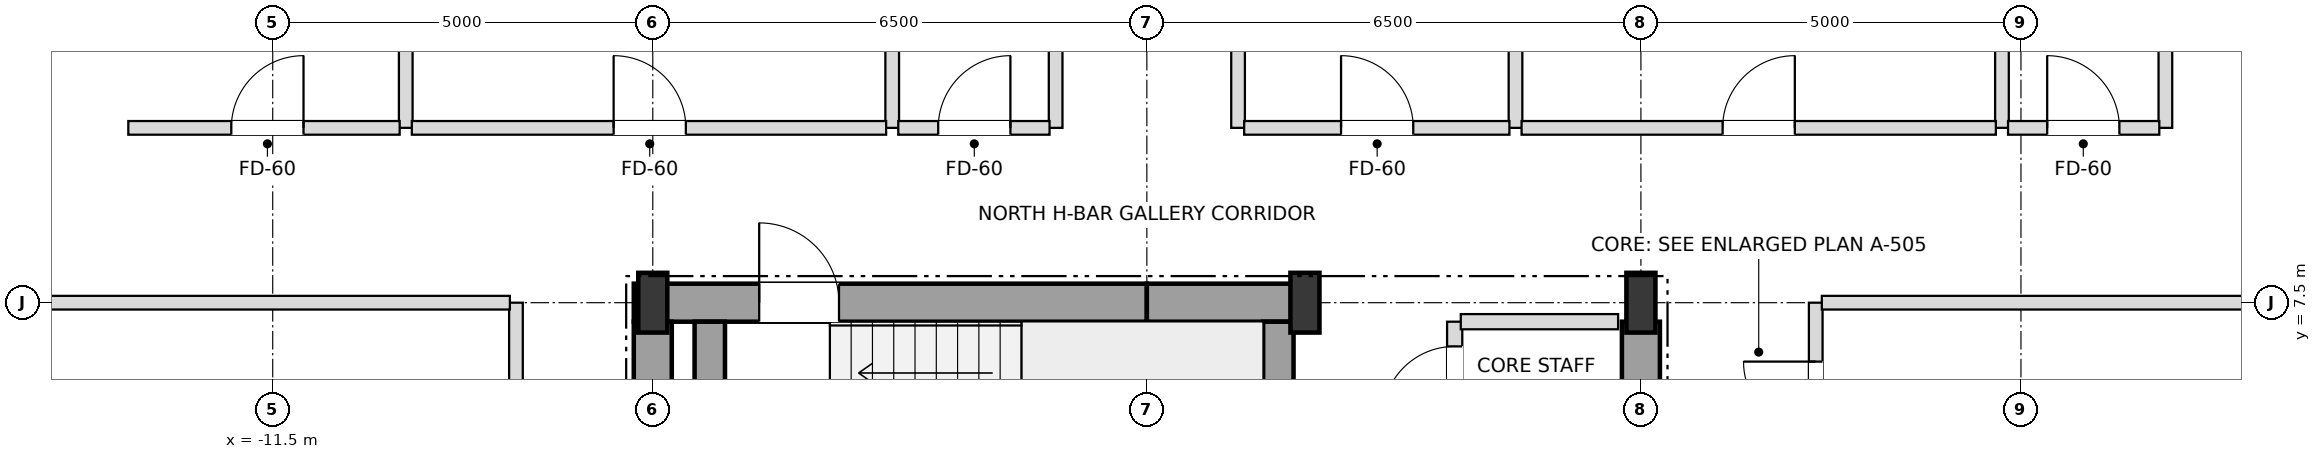
"""IFC4 building model, lengths in metres.
Left out: names, types, materials, properties, quantities, classifications, styles, units other than length and angle.
Written with IfcOpenShell. Run it as: python <this file> out.ifc"""

import sys

from ifc_helpers import new_model, si_unit, direction, frame, frame_2d, origin, origin_2d, place, context, subcontext, project, spatial, rectangle, i_section, extrude, element, fill, save


model = new_model("IFC4")
c1 = context("Model", 3, precision=1e-05, world=origin(), true_north=direction((0.0, 1.0)))
c2 = subcontext(c1, "Body", "Model", "MODEL_VIEW")
j1 = project(units=[si_unit("LENGTHUNIT", "METRE"), si_unit("PLANEANGLEUNIT", "RADIAN")], contexts=[c1])
p1 = place(None, origin())
s1 = spatial("IfcSite", under=j1, at=p1, CompositionType="ELEMENT")
p2 = place(p1, origin())
s2 = spatial("IfcBuilding", under=s1, at=p2, CompositionType="ELEMENT")
p3 = place(p2, frame((0.0, 0.0, 208.8)))
s3 = spatial("IfcBuildingStorey", under=s2, at=p3, CompositionType="ELEMENT", Elevation=208.8)
for number, where, z_axis, x_axis in (
    (1, (-6.5, 7.5, 0.0), (0.0, 0.0, 1.0), (1.0, 0.0, 0.0)),
    (2, (2.08, 7.5, 0.0), (0.0, 0.0, 1.0), (1.0, 0.0, 0.0)),
    (3, (6.5, 7.5, 0.0), (0.0, 0.0, 1.0), (1.0, 0.0, 0.0)),
):
    element("IfcColumn", number, at=place(p3, frame(where, z_axis=z_axis, x_axis=x_axis)), inside=s3, PredefinedType="COLUMN", context=c2, shape_type="SweptSolid", body=[
        extrude(i_section(OverallWidth=0.382, OverallDepth=0.786, WebThickness=0.02, FlangeThickness=0.033, at=origin_2d()), origin(), (0.0, 0.0, 1.0), 3.6),
    ])
p4 = place(p3, frame((-6.75, 7.5, 0.0), z_axis=(0.0, 0.0, 1.0), x_axis=(1.0, 0.0, 0.0)))
e4 = element("IfcWall", 4, at=p4, inside=s3, PredefinedType="SHEAR", context=c2, shape_type="SweptSolid", body=[
    extrude(rectangle(XDim=6.75, YDim=0.5, at=frame_2d((3.375, 0.0))), origin(), (0.0, 0.0, 1.0), 3.3),
])
p5 = place(p4, frame((1.65, 0.0, 0.0)))
e5 = element("IfcOpeningElement", 5, at=p5, cuts=e4, PredefinedType="OPENING", context=c2, shape_type="SweptSolid", body=[
    extrude(rectangle(XDim=1.05, YDim=2.15, at=frame_2d((0.525, 1.075))), frame((0.0, 0.26, 0.0), z_axis=(0.0, -1.0, 0.0), x_axis=(1.0, 0.0, 0.0)), (0.0, 0.0, 1.0), 0.52),
])
p6 = place(p3, frame((0.0, 7.5, 0.0), z_axis=(0.0, 0.0, 1.0), x_axis=(1.0, 0.0, 0.0)))
e6 = element("IfcWall", 6, at=p6, inside=s3, PredefinedType="SHEAR", context=c2, shape_type="SweptSolid", body=[
    extrude(rectangle(XDim=2.08, YDim=0.5, at=frame_2d((1.04, 0.0))), origin(), (0.0, 0.0, 1.0), 3.3),
])
for number, where, z_axis, x_axis in (
    (7, (-6.5, 3.95, 0.0), (0.0, 0.0, 1.0), (0.0, 1.0, 0.0)),
    (8, (6.5, 3.95, 0.0), (0.0, 0.0, 1.0), (0.0, 1.0, 0.0)),
):
    element("IfcWall", number, at=place(p3, frame(where, z_axis=z_axis, x_axis=x_axis)), inside=s3, PredefinedType="SHEAR", context=c2, shape_type="SweptSolid", body=[
        extrude(rectangle(XDim=3.3, YDim=0.5, at=frame_2d((1.65, 0.0))), origin(), (0.0, 0.0, 1.0), 3.3),
    ])
for number, where, z_axis, x_axis in (
    (9, (1.73, 3.95, 0.0), (0.0, 0.0, 1.0), (0.0, 1.0, 0.0)),
    (10, (-5.75, 3.95, 0.0), (0.0, 0.0, 1.0), (0.0, 1.0, 0.0)),
):
    element("IfcWall", number, at=place(p3, frame(where, z_axis=z_axis, x_axis=x_axis)), inside=s3, PredefinedType="SHEAR", context=c2, shape_type="SweptSolid", body=[
        extrude(rectangle(XDim=3.3, YDim=0.4, at=frame_2d((1.65, 0.0))), origin(), (0.0, 0.0, 1.0), 3.3),
    ])
p7 = place(p3, frame((-9.75, 9.8, 0.0), z_axis=(0.0, 0.0, 1.0), x_axis=(0.0, 1.0, 0.0)))
e11 = element("IfcWall", 11, at=p7, inside=s3, PredefinedType="PARTITIONING", context=c2, shape_type="SweptSolid", body=[
    extrude(rectangle(XDim=11.6, YDim=0.18, at=frame_2d((5.8, 0.0))), origin(), (0.0, 0.0, 1.0), 2.746),
])
p8 = place(p3, frame((-8.3, -7.5, 0.0), z_axis=(0.0, 0.0, 1.0), x_axis=(0.0, 1.0, 0.0)))
e12 = element("IfcWall", 12, at=p8, inside=s3, PredefinedType="PARTITIONING", context=c2, shape_type="SweptSolid", body=[
    extrude(rectangle(XDim=15.0, YDim=0.18, at=frame_2d((7.5, 0.0))), origin(), (0.0, 0.0, 1.0), 3.3),
])
p9 = place(p8, frame((0.665, 0.0, 0.0)))
e13 = element("IfcOpeningElement", 13, at=p9, cuts=e12, PredefinedType="OPENING", context=c2, shape_type="SweptSolid", body=[
    extrude(rectangle(XDim=0.95, YDim=2.15, at=frame_2d((0.475, 1.075))), frame((0.0, 0.1, 0.0), z_axis=(0.0, -1.0, 0.0), x_axis=(1.0, 0.0, 0.0)), (0.0, 0.0, 1.0), 0.2),
])
p10 = place(p8, frame((2.665, 0.0, 0.0)))
e14 = element("IfcOpeningElement", 14, at=p10, cuts=e12, PredefinedType="OPENING", context=c2, shape_type="SweptSolid", body=[
    extrude(rectangle(XDim=0.95, YDim=2.15, at=frame_2d((0.475, 1.075))), frame((0.0, 0.1, 0.0), z_axis=(0.0, -1.0, 0.0), x_axis=(1.0, 0.0, 0.0)), (0.0, 0.0, 1.0), 0.2),
])
for number, where, z_axis, x_axis in (
    (15, (-3.35, 9.8, 0.0), (0.0, 0.0, 1.0), (0.0, 1.0, 0.0)),
    (16, (-1.2, 9.8, 0.0), (0.0, 0.0, 1.0), (0.0, 1.0, 0.0)),
    (17, (1.2, 9.8, 0.0), (0.0, 0.0, 1.0), (0.0, 1.0, 0.0)),
):
    element("IfcWall", number, at=place(p3, frame(where, z_axis=z_axis, x_axis=x_axis)), inside=s3, PredefinedType="PARTITIONING", context=c2, shape_type="SweptSolid", body=[
        extrude(rectangle(XDim=11.6, YDim=0.18, at=frame_2d((5.8, 0.0))), origin(), (0.0, 0.0, 1.0), 2.746),
    ])
p11 = place(p3, frame((4.05, 4.2, 0.0), z_axis=(0.0, 0.0, 1.0), x_axis=(0.0, 1.0, 0.0)))
e18 = element("IfcWall", 18, at=p11, inside=s3, PredefinedType="SOLIDWALL", context=c2, shape_type="SweptSolid", body=[
    extrude(rectangle(XDim=3.05, YDim=0.2, at=frame_2d((1.525, 0.0))), origin(), (0.0, 0.0, 1.0), 3.3),
])
p12 = place(p11, frame((0.275, 0.0, 0.0)))
e19 = element("IfcOpeningElement", 19, at=p12, cuts=e18, PredefinedType="OPENING", context=c2, shape_type="SweptSolid", body=[
    extrude(rectangle(XDim=0.95, YDim=2.15, at=frame_2d((0.475, 1.075))), frame((0.0, 0.11, 0.0), z_axis=(0.0, -1.0, 0.0), x_axis=(1.0, 0.0, 0.0)), (0.0, 0.0, 1.0), 0.22),
])
p13 = place(p11, frame((1.775, 0.0, 0.0)))
e20 = element("IfcOpeningElement", 20, at=p13, cuts=e18, PredefinedType="OPENING", context=c2, shape_type="SweptSolid", body=[
    extrude(rectangle(XDim=0.95, YDim=2.15, at=frame_2d((0.475, 1.075))), frame((0.0, 0.11, 0.0), z_axis=(0.0, -1.0, 0.0), x_axis=(1.0, 0.0, 0.0)), (0.0, 0.0, 1.0), 0.22),
])
p14 = place(p3, frame((4.85, 9.8, 0.0), z_axis=(0.0, 0.0, 1.0), x_axis=(0.0, 1.0, 0.0)))
e21 = element("IfcWall", 21, at=p14, inside=s3, PredefinedType="PARTITIONING", context=c2, shape_type="SweptSolid", body=[
    extrude(rectangle(XDim=11.6, YDim=0.18, at=frame_2d((5.8, 0.0))), origin(), (0.0, 0.0, 1.0), 2.746),
])
p15 = place(p3, frame((8.8, -7.5, 0.0), z_axis=(0.0, 0.0, 1.0), x_axis=(0.0, 1.0, 0.0)))
e22 = element("IfcWall", 22, at=p15, inside=s3, PredefinedType="PARTITIONING", context=c2, shape_type="SweptSolid", body=[
    extrude(rectangle(XDim=15.0, YDim=0.18, at=frame_2d((7.5, 0.0))), origin(), (0.0, 0.0, 1.0), 3.3),
])
p16 = place(p15, frame((2.075, 0.0, 0.0)))
e23 = element("IfcOpeningElement", 23, at=p16, cuts=e22, PredefinedType="OPENING", context=c2, shape_type="SweptSolid", body=[
    extrude(rectangle(XDim=0.95, YDim=2.15, at=frame_2d((0.475, 1.075))), frame((0.0, 0.1, 0.0), z_axis=(0.0, -1.0, 0.0), x_axis=(1.0, 0.0, 0.0)), (0.0, 0.0, 1.0), 0.2),
])
p17 = place(p15, frame((8.325, 0.0, 0.0)))
e24 = element("IfcOpeningElement", 24, at=p17, cuts=e22, PredefinedType="OPENING", context=c2, shape_type="SweptSolid", body=[
    extrude(rectangle(XDim=0.95, YDim=2.15, at=frame_2d((0.475, 1.075))), frame((0.0, 0.1, 0.0), z_axis=(0.0, -1.0, 0.0), x_axis=(1.0, 0.0, 0.0)), (0.0, 0.0, 1.0), 0.2),
])
p18 = place(p15, frame((13.275, 0.0, 0.0)))
e25 = element("IfcOpeningElement", 25, at=p18, cuts=e22, PredefinedType="OPENING", context=c2, shape_type="SweptSolid", body=[
    extrude(rectangle(XDim=0.95, YDim=2.15, at=frame_2d((0.475, 1.075))), frame((0.0, 0.1, 0.0), z_axis=(0.0, -1.0, 0.0), x_axis=(1.0, 0.0, 0.0)), (0.0, 0.0, 1.0), 0.2),
])
p19 = place(p3, frame((11.25, 9.8, 0.0), z_axis=(0.0, 0.0, 1.0), x_axis=(0.0, 1.0, 0.0)))
e26 = element("IfcWall", 26, at=p19, inside=s3, PredefinedType="PARTITIONING", context=c2, shape_type="SweptSolid", body=[
    extrude(rectangle(XDim=11.6, YDim=0.18, at=frame_2d((5.8, 0.0))), origin(), (0.0, 0.0, 1.0), 2.59),
])
p20 = place(p19, frame((6.925, 0.0, 0.0)))
e27 = element("IfcOpeningElement", 27, at=p20, cuts=e26, PredefinedType="OPENING", context=c2, shape_type="SweptSolid", body=[
    extrude(rectangle(XDim=0.95, YDim=2.15, at=frame_2d((0.475, 1.075))), frame((0.0, 0.1, 0.0), z_axis=(0.0, -1.0, 0.0), x_axis=(1.0, 0.0, 0.0)), (0.0, 0.0, 1.0), 0.2),
])
p21 = place(p3, frame((13.4, 9.8, 0.0), z_axis=(0.0, 0.0, 1.0), x_axis=(0.0, 1.0, 0.0)))
e28 = element("IfcWall", 28, at=p21, inside=s3, PredefinedType="PARTITIONING", context=c2, shape_type="SweptSolid", body=[
    extrude(rectangle(XDim=3.2, YDim=0.18, at=frame_2d((1.6, 0.0))), origin(), (0.0, 0.0, 1.0), 3.3),
])
p22 = place(p3, frame((4.13, 7.25, 0.0), z_axis=(0.0, 0.0, 1.0), x_axis=(1.0, 0.0, 0.0)))
e29 = element("IfcWall", 29, at=p22, inside=s3, PredefinedType="SOLIDWALL", context=c2, shape_type="SweptSolid", body=[
    extrude(rectangle(XDim=2.07, YDim=0.2, at=frame_2d((1.035, 0.0))), origin(), (0.0, 0.0, 1.0), 3.3),
])
p23 = place(p3, frame((-18.4, 7.5, 0.0), z_axis=(0.0, 0.0, 1.0), x_axis=(1.0, 0.0, 0.0)))
e30 = element("IfcWall", 30, at=p23, inside=s3, PredefinedType="PARTITIONING", context=c2, shape_type="SweptSolid", body=[
    extrude(rectangle(XDim=10.02, YDim=0.18, at=frame_2d((5.01, 0.0))), origin(), (0.0, 0.0, 1.0), 2.746),
])
p24 = place(p3, frame((8.88, 7.5, 0.0), z_axis=(0.0, 0.0, 1.0), x_axis=(1.0, 0.0, 0.0)))
e31 = element("IfcWall", 31, at=p24, inside=s3, PredefinedType="PARTITIONING", context=c2, shape_type="SweptSolid", body=[
    extrude(rectangle(XDim=9.52, YDim=0.18, at=frame_2d((4.76, 0.0))), origin(), (0.0, 0.0, 1.0), 2.746),
])
p25 = place(p3, frame((-13.4, 9.8, 0.0), z_axis=(0.0, 0.0, 1.0), x_axis=(1.0, 0.0, 0.0)))
e32 = element("IfcWall", 32, at=p25, inside=s3, PredefinedType="PARTITIONING", context=c2, shape_type="SweptSolid", body=[
    extrude(rectangle(XDim=3.57, YDim=0.18, at=frame_2d((1.785, 0.0))), origin(), (0.0, 0.0, 1.0), 3.3),
])
p26 = place(p25, frame((1.355, 0.0, 0.0)))
e33 = element("IfcOpeningElement", 33, at=p26, cuts=e32, PredefinedType="OPENING", context=c2, shape_type="SweptSolid", body=[
    extrude(rectangle(XDim=0.95, YDim=2.15, at=frame_2d((0.475, 1.075))), frame((0.0, 0.1, 0.0), z_axis=(0.0, -1.0, 0.0), x_axis=(1.0, 0.0, 0.0)), (0.0, 0.0, 1.0), 0.2),
])
p27 = place(p3, frame((-9.67, 9.8, 0.0), z_axis=(0.0, 0.0, 1.0), x_axis=(1.0, 0.0, 0.0)))
e34 = element("IfcWall", 34, at=p27, inside=s3, PredefinedType="PARTITIONING", context=c2, shape_type="SweptSolid", body=[
    extrude(rectangle(XDim=6.24, YDim=0.18, at=frame_2d((3.12, 0.0))), origin(), (0.0, 0.0, 1.0), 2.746),
])
p28 = place(p27, frame((2.655, 0.0, 0.0)))
e35 = element("IfcOpeningElement", 35, at=p28, cuts=e34, PredefinedType="OPENING", context=c2, shape_type="SweptSolid", body=[
    extrude(rectangle(XDim=0.95, YDim=2.15, at=frame_2d((0.475, 1.075))), frame((0.0, 0.1, 0.0), z_axis=(0.0, -1.0, 0.0), x_axis=(1.0, 0.0, 0.0)), (0.0, 0.0, 1.0), 0.2),
])
p29 = place(p3, frame((-3.27, 9.8, 0.0), z_axis=(0.0, 0.0, 1.0), x_axis=(1.0, 0.0, 0.0)))
e36 = element("IfcWall", 36, at=p29, inside=s3, PredefinedType="PARTITIONING", context=c2, shape_type="SweptSolid", body=[
    extrude(rectangle(XDim=1.99, YDim=0.18, at=frame_2d((0.995, 0.0))), origin(), (0.0, 0.0, 1.0), 3.3),
])
p30 = place(p29, frame((0.525, 0.0, 0.0)))
e37 = element("IfcOpeningElement", 37, at=p30, cuts=e36, PredefinedType="OPENING", context=c2, shape_type="SweptSolid", body=[
    extrude(rectangle(XDim=0.95, YDim=2.15, at=frame_2d((0.475, 1.075))), frame((0.0, 0.1, 0.0), z_axis=(0.0, -1.0, 0.0), x_axis=(1.0, 0.0, 0.0)), (0.0, 0.0, 1.0), 0.2),
])
p31 = place(p3, frame((1.28, 9.8, 0.0), z_axis=(0.0, 0.0, 1.0), x_axis=(1.0, 0.0, 0.0)))
e38 = element("IfcWall", 38, at=p31, inside=s3, PredefinedType="PARTITIONING", context=c2, shape_type="SweptSolid", body=[
    extrude(rectangle(XDim=3.49, YDim=0.18, at=frame_2d((1.745, 0.0))), origin(), (0.0, 0.0, 1.0), 3.3),
])
p32 = place(p31, frame((1.275, 0.0, 0.0)))
e39 = element("IfcOpeningElement", 39, at=p32, cuts=e38, PredefinedType="OPENING", context=c2, shape_type="SweptSolid", body=[
    extrude(rectangle(XDim=0.95, YDim=2.15, at=frame_2d((0.475, 1.075))), frame((0.0, 0.1, 0.0), z_axis=(0.0, -1.0, 0.0), x_axis=(1.0, 0.0, 0.0)), (0.0, 0.0, 1.0), 0.2),
])
p33 = place(p3, frame((4.93, 9.8, 0.0), z_axis=(0.0, 0.0, 1.0), x_axis=(1.0, 0.0, 0.0)))
e40 = element("IfcWall", 40, at=p33, inside=s3, PredefinedType="PARTITIONING", context=c2, shape_type="SweptSolid", body=[
    extrude(rectangle(XDim=6.24, YDim=0.18, at=frame_2d((3.12, 0.0))), origin(), (0.0, 0.0, 1.0), 2.746),
])
p34 = place(p33, frame((2.645, 0.0, 0.0)))
e41 = element("IfcOpeningElement", 41, at=p34, cuts=e40, PredefinedType="OPENING", context=c2, shape_type="SweptSolid", body=[
    extrude(rectangle(XDim=0.95, YDim=2.15, at=frame_2d((0.475, 1.075))), frame((0.0, 0.1, 0.0), z_axis=(0.0, -1.0, 0.0), x_axis=(1.0, 0.0, 0.0)), (0.0, 0.0, 1.0), 0.2),
])
p35 = place(p3, frame((11.33, 9.8, 0.0), z_axis=(0.0, 0.0, 1.0), x_axis=(1.0, 0.0, 0.0)))
e42 = element("IfcWall", 42, at=p35, inside=s3, PredefinedType="PARTITIONING", context=c2, shape_type="SweptSolid", body=[
    extrude(rectangle(XDim=1.99, YDim=0.18, at=frame_2d((0.995, 0.0))), origin(), (0.0, 0.0, 1.0), 3.3),
])
p36 = place(p35, frame((0.515, 0.0, 0.0)))
e43 = element("IfcOpeningElement", 43, at=p36, cuts=e42, PredefinedType="OPENING", context=c2, shape_type="SweptSolid", body=[
    extrude(rectangle(XDim=0.95, YDim=2.15, at=frame_2d((0.475, 1.075))), frame((0.0, 0.1, 0.0), z_axis=(0.0, -1.0, 0.0), x_axis=(1.0, 0.0, 0.0)), (0.0, 0.0, 1.0), 0.2),
])
p37 = place(p5, origin())
e44 = element("IfcDoor", 44, at=p37, inside=s3, OperationType="SINGLE_SWING_LEFT", PredefinedType="DOOR", context=c2, shape_type="SweptSolid", body=[
    extrude(rectangle(XDim=1.05, YDim=2.15, at=frame_2d((0.525, 1.075))), frame((0.0, 0.025, 0.0), z_axis=(0.0, -1.0, 0.0), x_axis=(1.0, 0.0, 0.0)), (0.0, 0.0, 1.0), 0.05),
])
fill(e5, e44)
p38 = place(p13, origin())
e45 = element("IfcDoor", 45, at=p38, inside=s3, OperationType="SINGLE_SWING_LEFT", PredefinedType="DOOR", context=c2, shape_type="SweptSolid", body=[
    extrude(rectangle(XDim=0.95, YDim=2.15, at=frame_2d((0.475, 1.075))), frame((0.0, 0.025, 0.0), z_axis=(0.0, -1.0, 0.0), x_axis=(1.0, 0.0, 0.0)), (0.0, 0.0, 1.0), 0.05),
])
fill(e20, e45)
p39 = place(p26, origin())
e46 = element("IfcDoor", 46, at=p39, inside=s3, OperationType="SINGLE_SWING_RIGHT", PredefinedType="DOOR", context=c2, shape_type="SweptSolid", body=[
    extrude(rectangle(XDim=0.95, YDim=2.15, at=frame_2d((0.475, 1.075))), frame((0.0, 0.025, 0.0), z_axis=(0.0, -1.0, 0.0), x_axis=(1.0, 0.0, 0.0)), (0.0, 0.0, 1.0), 0.05),
])
fill(e33, e46)
p40 = place(p28, origin())
e47 = element("IfcDoor", 47, at=p40, inside=s3, OperationType="SINGLE_SWING_LEFT", PredefinedType="DOOR", context=c2, shape_type="SweptSolid", body=[
    extrude(rectangle(XDim=0.95, YDim=2.15, at=frame_2d((0.475, 1.075))), frame((0.0, 0.025, 0.0), z_axis=(0.0, -1.0, 0.0), x_axis=(1.0, 0.0, 0.0)), (0.0, 0.0, 1.0), 0.05),
])
fill(e35, e47)
p41 = place(p30, origin())
e48 = element("IfcDoor", 48, at=p41, inside=s3, OperationType="SINGLE_SWING_RIGHT", PredefinedType="DOOR", context=c2, shape_type="SweptSolid", body=[
    extrude(rectangle(XDim=0.95, YDim=2.15, at=frame_2d((0.475, 1.075))), frame((0.0, 0.025, 0.0), z_axis=(0.0, -1.0, 0.0), x_axis=(1.0, 0.0, 0.0)), (0.0, 0.0, 1.0), 0.05),
])
fill(e37, e48)
p42 = place(p36, origin())
e49 = element("IfcDoor", 49, at=p42, inside=s3, OperationType="SINGLE_SWING_LEFT", PredefinedType="DOOR", context=c2, shape_type="SweptSolid", body=[
    extrude(rectangle(XDim=0.95, YDim=2.15, at=frame_2d((0.475, 1.075))), frame((0.0, 0.025, 0.0), z_axis=(0.0, -1.0, 0.0), x_axis=(1.0, 0.0, 0.0)), (0.0, 0.0, 1.0), 0.05),
])
fill(e43, e49)
p43 = place(p32, origin())
e50 = element("IfcDoor", 50, at=p43, inside=s3, OperationType="SINGLE_SWING_LEFT", PredefinedType="DOOR", context=c2, shape_type="SweptSolid", body=[
    extrude(rectangle(XDim=0.95, YDim=2.15, at=frame_2d((0.475, 1.075))), frame((0.0, 0.025, 0.0), z_axis=(0.0, -1.0, 0.0), x_axis=(1.0, 0.0, 0.0)), (0.0, 0.0, 1.0), 0.05),
])
fill(e39, e50)
p44 = place(p34, origin())
e51 = element("IfcDoor", 51, at=p44, inside=s3, OperationType="SINGLE_SWING_RIGHT", PredefinedType="DOOR", context=c2, shape_type="SweptSolid", body=[
    extrude(rectangle(XDim=0.95, YDim=2.15, at=frame_2d((0.475, 1.075))), frame((0.0, 0.025, 0.0), z_axis=(0.0, -1.0, 0.0), x_axis=(1.0, 0.0, 0.0)), (0.0, 0.0, 1.0), 0.05),
])
fill(e41, e51)
p45 = place(p18, origin())
e52 = element("IfcDoor", 52, at=p45, inside=s3, OperationType="SINGLE_SWING_RIGHT", PredefinedType="DOOR", context=c2, shape_type="SweptSolid", body=[
    extrude(rectangle(XDim=0.95, YDim=2.15, at=frame_2d((0.475, 1.075))), frame((0.0, 0.025, 0.0), z_axis=(0.0, -1.0, 0.0), x_axis=(1.0, 0.0, 0.0)), (0.0, 0.0, 1.0), 0.05),
])
fill(e25, e52)
save(model, sys.argv[1])
